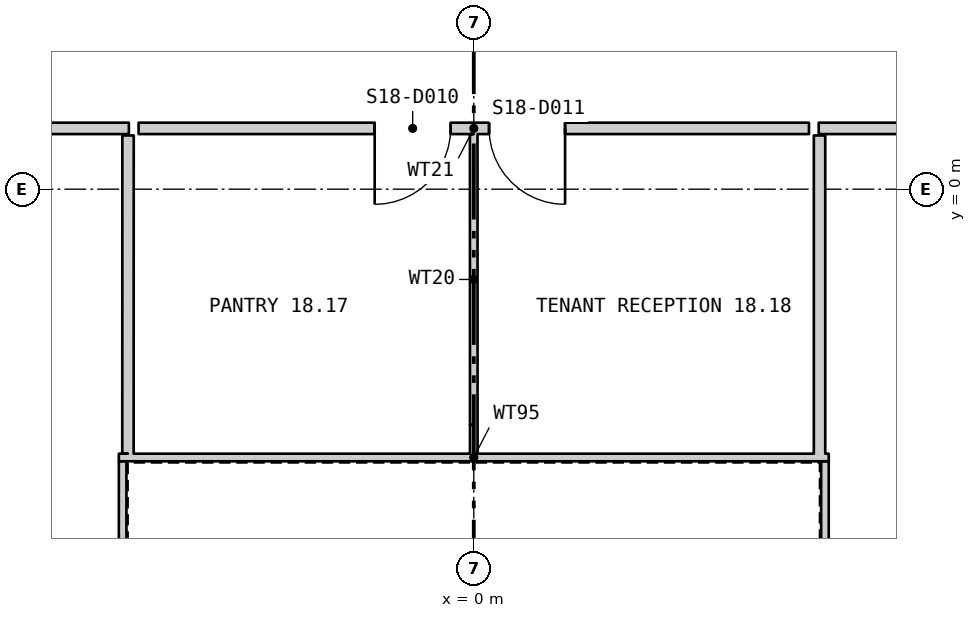
"""IFC4 building model, lengths in metres.
Left out: names, types, materials, properties, quantities, classifications, styles, units other than length and angle.
Written with IfcOpenShell. Run it as: python <this file> out.ifc"""

import sys

from ifc_helpers import new_model, si_unit, direction, frame, frame_2d, origin, place, context, subcontext, project, spatial, polyline, rectangle, outline, extrude, element, fill, save


model = new_model("IFC4")
c1 = context("Model", 3, precision=1e-05, world=origin(), true_north=direction((0.0, 1.0)))
c2 = subcontext(c1, "Body", "Model", "MODEL_VIEW")
j1 = project(units=[si_unit("LENGTHUNIT", "METRE"), si_unit("PLANEANGLEUNIT", "RADIAN")], contexts=[c1])
p1 = place(None, origin())
s1 = spatial("IfcSite", under=j1, at=p1, CompositionType="ELEMENT")
p2 = place(p1, origin())
s2 = spatial("IfcBuilding", under=s1, at=p2, CompositionType="ELEMENT")
p3 = place(p2, frame((0.0, 0.0, 245.4)))
s3 = spatial("IfcBuildingStorey", under=s2, at=p3, CompositionType="ELEMENT", Elevation=245.4)
p4 = place(p3, frame((-25.85, 14.822, -0.18), z_axis=(0.0, 0.0, 1.0), x_axis=(0.500000335318, -0.866025210188, 0.0)))
e1 = element("IfcWall", 1, at=p4, inside=s3, PredefinedType="SOLIDWALL", context=c2, shape_type="SweptSolid", body=[
    extrude(outline(polyline([(-0.13, -0.225), (45.88, -0.225), (45.62, 0.225), (0.13, 0.225), (-0.13, -0.225)])), origin(), (0.0, 0.0, 1.0), 3.68),
])
p5 = place(p4, frame((1.425, 0.0, 1.08)))
e2 = element("IfcOpeningElement", 2, at=p5, cuts=e1, PredefinedType="OPENING", context=c2, shape_type="SweptSolid", body=[
    extrude(rectangle(XDim=2.4, YDim=2.0, at=frame_2d((1.2, 1.0))), frame((0.0, 0.235, 0.0), z_axis=(0.0, -1.0, 0.0), x_axis=(1.0, 0.0, 0.0)), (0.0, 0.0, 1.0), 0.47),
])
p6 = place(p4, frame((10.403, 0.0, 1.08)))
e3 = element("IfcOpeningElement", 3, at=p6, cuts=e1, PredefinedType="OPENING", context=c2, shape_type="SweptSolid", body=[
    extrude(rectangle(XDim=2.4, YDim=2.0, at=frame_2d((1.2, 1.0))), frame((0.0, 0.235, 0.0), z_axis=(0.0, -1.0, 0.0), x_axis=(1.0, 0.0, 0.0)), (0.0, 0.0, 1.0), 0.47),
])
p7 = place(p4, frame((14.912, 0.0, 1.08)))
e4 = element("IfcOpeningElement", 4, at=p7, cuts=e1, PredefinedType="OPENING", context=c2, shape_type="SweptSolid", body=[
    extrude(rectangle(XDim=2.4, YDim=2.0, at=frame_2d((1.2, 1.0))), frame((0.0, 0.235, 0.0), z_axis=(0.0, -1.0, 0.0), x_axis=(1.0, 0.0, 0.0)), (0.0, 0.0, 1.0), 0.47),
])
p8 = place(p4, frame((19.421, 0.0, 1.08)))
e5 = element("IfcOpeningElement", 5, at=p8, cuts=e1, PredefinedType="OPENING", context=c2, shape_type="SweptSolid", body=[
    extrude(rectangle(XDim=2.4, YDim=2.0, at=frame_2d((1.2, 1.0))), frame((0.0, 0.235, 0.0), z_axis=(0.0, -1.0, 0.0), x_axis=(1.0, 0.0, 0.0)), (0.0, 0.0, 1.0), 0.47),
])
p9 = place(p4, frame((23.929, 0.0, 1.08)))
e6 = element("IfcOpeningElement", 6, at=p9, cuts=e1, PredefinedType="OPENING", context=c2, shape_type="SweptSolid", body=[
    extrude(rectangle(XDim=2.4, YDim=2.0, at=frame_2d((1.2, 1.0))), frame((0.0, 0.235, 0.0), z_axis=(0.0, -1.0, 0.0), x_axis=(1.0, 0.0, 0.0)), (0.0, 0.0, 1.0), 0.47),
])
p10 = place(p4, frame((28.438, 0.0, 1.08)))
e7 = element("IfcOpeningElement", 7, at=p10, cuts=e1, PredefinedType="OPENING", context=c2, shape_type="SweptSolid", body=[
    extrude(rectangle(XDim=2.4, YDim=2.0, at=frame_2d((1.2, 1.0))), frame((0.0, 0.235, 0.0), z_axis=(0.0, -1.0, 0.0), x_axis=(1.0, 0.0, 0.0)), (0.0, 0.0, 1.0), 0.47),
])
p11 = place(p4, frame((32.947, 0.0, 1.08)))
e8 = element("IfcOpeningElement", 8, at=p11, cuts=e1, PredefinedType="OPENING", context=c2, shape_type="SweptSolid", body=[
    extrude(rectangle(XDim=2.4, YDim=2.0, at=frame_2d((1.2, 1.0))), frame((0.0, 0.235, 0.0), z_axis=(0.0, -1.0, 0.0), x_axis=(1.0, 0.0, 0.0)), (0.0, 0.0, 1.0), 0.47),
])
p12 = place(p4, frame((37.455, 0.0, 1.08)))
e9 = element("IfcOpeningElement", 9, at=p12, cuts=e1, PredefinedType="OPENING", context=c2, shape_type="SweptSolid", body=[
    extrude(rectangle(XDim=2.4, YDim=2.0, at=frame_2d((1.2, 1.0))), frame((0.0, 0.235, 0.0), z_axis=(0.0, -1.0, 0.0), x_axis=(1.0, 0.0, 0.0)), (0.0, 0.0, 1.0), 0.47),
])
p13 = place(p4, frame((41.925, 0.0, 1.08)))
e10 = element("IfcOpeningElement", 10, at=p13, cuts=e1, PredefinedType="OPENING", context=c2, shape_type="SweptSolid", body=[
    extrude(rectangle(XDim=2.4, YDim=2.0, at=frame_2d((1.2, 1.0))), frame((0.0, 0.235, 0.0), z_axis=(0.0, -1.0, 0.0), x_axis=(1.0, 0.0, 0.0)), (0.0, 0.0, 1.0), 0.47),
])
p14 = place(p3, frame((2.975, -24.799, -0.18), z_axis=(0.0, 0.0, 1.0), x_axis=(0.500000335318, 0.866025210188, 0.0)))
e11 = element("IfcWall", 11, at=p14, inside=s3, PredefinedType="SOLIDWALL", context=c2, shape_type="SweptSolid", body=[
    extrude(outline(polyline([(-0.13, -0.225), (45.88, -0.225), (45.62, 0.225), (0.13, 0.225), (-0.13, -0.225)])), origin(), (0.0, 0.0, 1.0), 3.68),
])
p15 = place(p14, frame((1.425, 0.0, 1.08)))
e12 = element("IfcOpeningElement", 12, at=p15, cuts=e11, PredefinedType="OPENING", context=c2, shape_type="SweptSolid", body=[
    extrude(rectangle(XDim=2.4, YDim=2.0, at=frame_2d((1.2, 1.0))), frame((0.0, 0.235, 0.0), z_axis=(0.0, -1.0, 0.0), x_axis=(1.0, 0.0, 0.0)), (0.0, 0.0, 1.0), 0.47),
])
p16 = place(p14, frame((5.895, 0.0, 1.08)))
e13 = element("IfcOpeningElement", 13, at=p16, cuts=e11, PredefinedType="OPENING", context=c2, shape_type="SweptSolid", body=[
    extrude(rectangle(XDim=2.4, YDim=2.0, at=frame_2d((1.2, 1.0))), frame((0.0, 0.235, 0.0), z_axis=(0.0, -1.0, 0.0), x_axis=(1.0, 0.0, 0.0)), (0.0, 0.0, 1.0), 0.47),
])
p17 = place(p14, frame((10.403, 0.0, 1.08)))
e14 = element("IfcOpeningElement", 14, at=p17, cuts=e11, PredefinedType="OPENING", context=c2, shape_type="SweptSolid", body=[
    extrude(rectangle(XDim=2.4, YDim=2.0, at=frame_2d((1.2, 1.0))), frame((0.0, 0.235, 0.0), z_axis=(0.0, -1.0, 0.0), x_axis=(1.0, 0.0, 0.0)), (0.0, 0.0, 1.0), 0.47),
])
p18 = place(p14, frame((14.912, 0.0, 1.08)))
e15 = element("IfcOpeningElement", 15, at=p18, cuts=e11, PredefinedType="OPENING", context=c2, shape_type="SweptSolid", body=[
    extrude(rectangle(XDim=2.4, YDim=2.0, at=frame_2d((1.2, 1.0))), frame((0.0, 0.235, 0.0), z_axis=(0.0, -1.0, 0.0), x_axis=(1.0, 0.0, 0.0)), (0.0, 0.0, 1.0), 0.47),
])
p19 = place(p14, frame((19.421, 0.0, 1.08)))
e16 = element("IfcOpeningElement", 16, at=p19, cuts=e11, PredefinedType="OPENING", context=c2, shape_type="SweptSolid", body=[
    extrude(rectangle(XDim=2.4, YDim=2.0, at=frame_2d((1.2, 1.0))), frame((0.0, 0.235, 0.0), z_axis=(0.0, -1.0, 0.0), x_axis=(1.0, 0.0, 0.0)), (0.0, 0.0, 1.0), 0.47),
])
p20 = place(p14, frame((23.929, 0.0, 1.08)))
e17 = element("IfcOpeningElement", 17, at=p20, cuts=e11, PredefinedType="OPENING", context=c2, shape_type="SweptSolid", body=[
    extrude(rectangle(XDim=2.4, YDim=2.0, at=frame_2d((1.2, 1.0))), frame((0.0, 0.235, 0.0), z_axis=(0.0, -1.0, 0.0), x_axis=(1.0, 0.0, 0.0)), (0.0, 0.0, 1.0), 0.47),
])
p21 = place(p14, frame((28.438, 0.0, 1.08)))
e18 = element("IfcOpeningElement", 18, at=p21, cuts=e11, PredefinedType="OPENING", context=c2, shape_type="SweptSolid", body=[
    extrude(rectangle(XDim=2.4, YDim=2.0, at=frame_2d((1.2, 1.0))), frame((0.0, 0.235, 0.0), z_axis=(0.0, -1.0, 0.0), x_axis=(1.0, 0.0, 0.0)), (0.0, 0.0, 1.0), 0.47),
])
p22 = place(p14, frame((32.947, 0.0, 1.08)))
e19 = element("IfcOpeningElement", 19, at=p22, cuts=e11, PredefinedType="OPENING", context=c2, shape_type="SweptSolid", body=[
    extrude(rectangle(XDim=2.4, YDim=2.0, at=frame_2d((1.2, 1.0))), frame((0.0, 0.235, 0.0), z_axis=(0.0, -1.0, 0.0), x_axis=(1.0, 0.0, 0.0)), (0.0, 0.0, 1.0), 0.47),
])
p23 = place(p14, frame((37.455, 0.0, 1.08)))
e20 = element("IfcOpeningElement", 20, at=p23, cuts=e11, PredefinedType="OPENING", context=c2, shape_type="SweptSolid", body=[
    extrude(rectangle(XDim=2.4, YDim=2.0, at=frame_2d((1.2, 1.0))), frame((0.0, 0.235, 0.0), z_axis=(0.0, -1.0, 0.0), x_axis=(1.0, 0.0, 0.0)), (0.0, 0.0, 1.0), 0.47),
])
p24 = place(p14, frame((41.925, 0.0, 1.08)))
e21 = element("IfcOpeningElement", 21, at=p24, cuts=e11, PredefinedType="OPENING", context=c2, shape_type="SweptSolid", body=[
    extrude(rectangle(XDim=2.4, YDim=2.0, at=frame_2d((1.2, 1.0))), frame((0.0, 0.235, 0.0), z_axis=(0.0, -1.0, 0.0), x_axis=(1.0, 0.0, 0.0)), (0.0, 0.0, 1.0), 0.47),
])
p25 = place(p3, frame((4.62, -11.62, 0.0), z_axis=(0.0, 0.0, 1.0), x_axis=(0.0, 1.0, 0.0)))
e22 = element("IfcWall", 22, at=p25, inside=s3, PredefinedType="PARTITIONING", context=c2, shape_type="SweptSolid", body=[
    extrude(rectangle(XDim=8.04, YDim=0.1, at=frame_2d((4.02, 0.0))), origin(), (0.0, 0.0, 1.0), 3.7),
])
p26 = place(p3, frame((4.67, -3.53, 0.0), z_axis=(0.0, 0.0, 1.0), x_axis=(-1.0, 0.0, 0.0)))
e23 = element("IfcWall", 23, at=p26, inside=s3, PredefinedType="PARTITIONING", context=c2, shape_type="SweptSolid", body=[
    extrude(rectangle(XDim=9.34, YDim=0.1, at=frame_2d((4.67, 0.0))), origin(), (0.0, 0.0, 1.0), 3.7),
])
p27 = place(p3, frame((-4.62, -3.58, 0.0), z_axis=(0.0, 0.0, 1.0), x_axis=(0.0, -1.0, 0.0)))
e24 = element("IfcWall", 24, at=p27, inside=s3, PredefinedType="PARTITIONING", context=c2, shape_type="SweptSolid", body=[
    extrude(rectangle(XDim=8.04, YDim=0.1, at=frame_2d((4.02, 0.0))), origin(), (0.0, 0.0, 1.0), 3.7),
])
p28 = place(p3, frame((-7.875, 0.8, 0.0), z_axis=(0.0, 0.0, 1.0), x_axis=(1.0, 0.0, 0.0)))
e25 = element("IfcWall", 25, at=p28, inside=s3, PredefinedType="PARTITIONING", context=c2, shape_type="SweptSolid", body=[
    extrude(rectangle(XDim=3.337, YDim=0.15, at=frame_2d((1.669, 0.0))), origin(), (0.0, 0.0, 1.0), 3.7),
])
p29 = place(p28, frame((1.168, 0.0, 0.0)))
e26 = element("IfcOpeningElement", 26, at=p29, cuts=e25, PredefinedType="OPENING", context=c2, shape_type="SweptSolid", body=[
    extrude(rectangle(XDim=1.0, YDim=2.1, at=frame_2d((0.5, 1.05))), frame((0.0, 0.085, 0.0), z_axis=(0.0, -1.0, 0.0), x_axis=(1.0, 0.0, 0.0)), (0.0, 0.0, 1.0), 0.17),
])
p30 = place(p3, frame((-4.55, -3.48, 0.0), z_axis=(0.0, 0.0, 1.0), x_axis=(0.000238834481, 0.999999971479, 0.0)))
e27 = element("IfcWall", 27, at=p30, inside=s3, PredefinedType="PARTITIONING", context=c2, shape_type="SweptSolid", body=[
    extrude(rectangle(XDim=4.187, YDim=0.15, at=frame_2d((2.094, 0.0))), origin(), (0.0, 0.0, 1.0), 3.7),
])
p31 = place(p3, frame((-4.41, 0.8, 0.0), z_axis=(0.0, 0.0, 1.0), x_axis=(1.0, 0.0, 0.0)))
e28 = element("IfcWall", 28, at=p31, inside=s3, PredefinedType="PARTITIONING", context=c2, shape_type="SweptSolid", body=[
    extrude(rectangle(XDim=8.82, YDim=0.15, at=frame_2d((4.41, 0.0))), origin(), (0.0, 0.0, 1.0), 3.7),
])
p32 = place(p31, frame((3.106, 0.0, 0.0)))
e29 = element("IfcOpeningElement", 29, at=p32, cuts=e28, PredefinedType="OPENING", context=c2, shape_type="SweptSolid", body=[
    extrude(rectangle(XDim=1.0, YDim=2.1, at=frame_2d((0.5, 1.05))), frame((0.0, 0.085, 0.0), z_axis=(0.0, -1.0, 0.0), x_axis=(1.0, 0.0, 0.0)), (0.0, 0.0, 1.0), 0.17),
])
p33 = place(p31, frame((4.611, 0.0, 0.0)))
e30 = element("IfcOpeningElement", 30, at=p33, cuts=e28, PredefinedType="OPENING", context=c2, shape_type="SweptSolid", body=[
    extrude(rectangle(XDim=1.0, YDim=2.1, at=frame_2d((0.5, 1.05))), frame((0.0, 0.085, 0.0), z_axis=(0.0, -1.0, 0.0), x_axis=(1.0, 0.0, 0.0)), (0.0, 0.0, 1.0), 0.17),
])
p34 = place(p3, frame((-0.001, 0.725, 0.0), z_axis=(0.0, 0.0, 1.0), x_axis=(0.000235294111, -0.999999972318, 0.0)))
e31 = element("IfcWall", 31, at=p34, inside=s3, PredefinedType="PARTITIONING", context=c2, shape_type="SweptSolid", body=[
    extrude(rectangle(XDim=3.825, YDim=0.1, at=frame_2d((1.913, 0.0))), origin(), (0.0, 0.0, 1.0), 3.2),
])
p35 = place(p3, frame((-0.0, -3.1, 0.0), z_axis=(0.0, 0.0, 1.0), x_axis=(0.000263157886, -0.999999965374, 0.0)))
e32 = element("IfcWall", 32, at=p35, inside=s3, PredefinedType="PARTITIONING", context=c2, shape_type="SweptSolid", body=[
    extrude(rectangle(XDim=0.38, YDim=0.1, at=frame_2d((0.19, 0.0))), origin(), (0.0, 0.0, 1.0), 3.7),
])
p36 = place(p3, frame((4.538, 0.8, 0.0), z_axis=(0.0, 0.0, 1.0), x_axis=(1.0, 0.0, 0.0)))
e33 = element("IfcWall", 33, at=p36, inside=s3, PredefinedType="PARTITIONING", context=c2, shape_type="SweptSolid", body=[
    extrude(rectangle(XDim=3.337, YDim=0.15, at=frame_2d((1.669, 0.0))), origin(), (0.0, 0.0, 1.0), 3.7),
])
p37 = place(p36, frame((1.168, 0.0, 0.0)))
e34 = element("IfcOpeningElement", 34, at=p37, cuts=e33, PredefinedType="OPENING", context=c2, shape_type="SweptSolid", body=[
    extrude(rectangle(XDim=1.0, YDim=2.1, at=frame_2d((0.5, 1.05))), frame((0.0, 0.085, 0.0), z_axis=(0.0, -1.0, 0.0), x_axis=(1.0, 0.0, 0.0)), (0.0, 0.0, 1.0), 0.17),
])
p38 = place(p3, frame((4.549, -3.48, 0.0), z_axis=(0.0, 0.0, 1.0), x_axis=(0.0, 1.0, 0.0)))
e35 = element("IfcWall", 35, at=p38, inside=s3, PredefinedType="PARTITIONING", context=c2, shape_type="SweptSolid", body=[
    extrude(rectangle(XDim=4.187, YDim=0.15, at=frame_2d((2.094, 0.0))), origin(), (0.0, 0.0, 1.0), 3.7),
])
p39 = place(p32, origin())
e36 = element("IfcDoor", 36, at=p39, inside=s3, OperationType="SINGLE_SWING_LEFT", PredefinedType="DOOR", context=c2, shape_type="SweptSolid", body=[
    extrude(rectangle(XDim=1.0, YDim=2.1, at=frame_2d((0.5, 1.05))), frame((0.0, 0.025, 0.0), z_axis=(0.0, -1.0, 0.0), x_axis=(1.0, 0.0, 0.0)), (0.0, 0.0, 1.0), 0.05),
])
fill(e29, e36)
p40 = place(p33, origin())
e37 = element("IfcDoor", 37, at=p40, inside=s3, OperationType="SINGLE_SWING_RIGHT", PredefinedType="DOOR", context=c2, shape_type="SweptSolid", body=[
    extrude(rectangle(XDim=1.0, YDim=2.1, at=frame_2d((0.5, 1.05))), frame((0.0, 0.025, 0.0), z_axis=(0.0, -1.0, 0.0), x_axis=(1.0, 0.0, 0.0)), (0.0, 0.0, 1.0), 0.05),
])
fill(e30, e37)
save(model, sys.argv[1])
